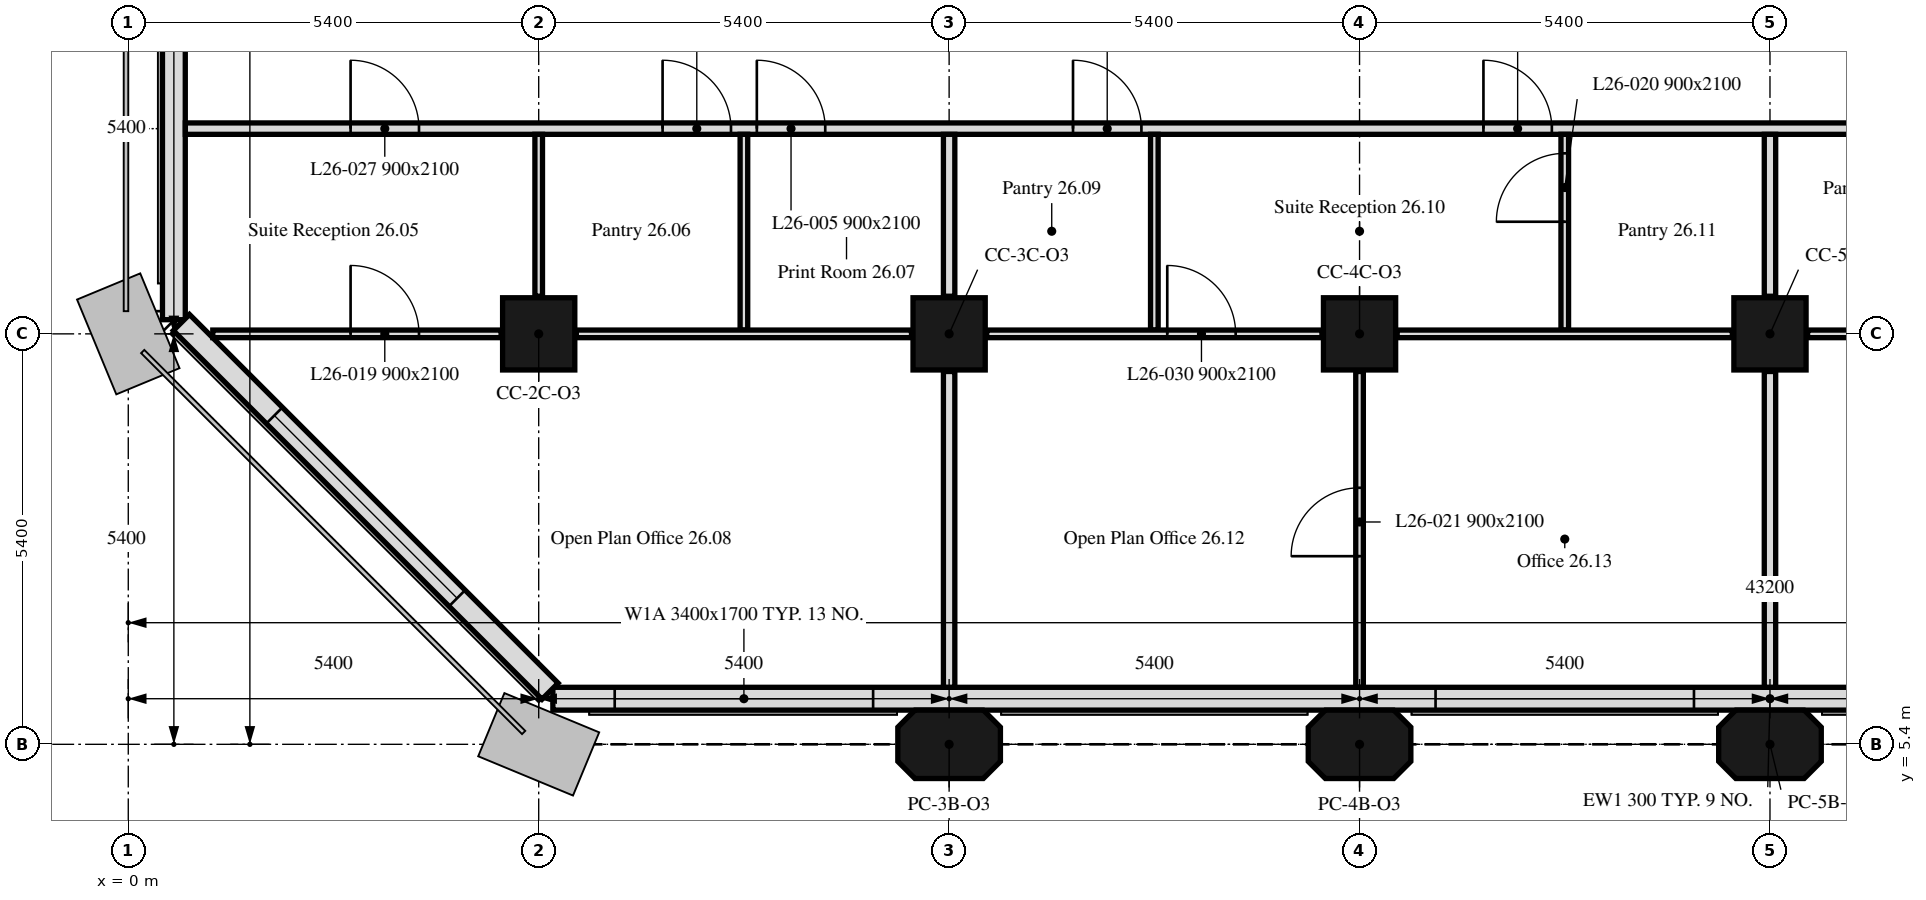
"""IFC4 building model, lengths in metres.
Left out: names, types, materials, properties, quantities, classifications, styles, units other than length and angle.
Written with IfcOpenShell. Run it as: python <this file> out.ifc"""

import sys

from ifc_helpers import new_model, si_unit, direction, frame, frame_2d, origin, origin_2d, place, context, subcontext, project, spatial, polyline, rectangle, outline, extrude, element, fill, save


model = new_model("IFC4")
c1 = context("Model", 3, precision=1e-05, world=origin(), true_north=direction((0.0, 1.0)))
c2 = subcontext(c1, "Body", "Model", "MODEL_VIEW")
j1 = project(units=[si_unit("LENGTHUNIT", "METRE"), si_unit("PLANEANGLEUNIT", "RADIAN")], contexts=[c1])
p1 = place(None, origin())
s1 = spatial("IfcSite", under=j1, at=p1, CompositionType="ELEMENT")
p2 = place(p1, origin())
s2 = spatial("IfcBuilding", under=s1, at=p2, CompositionType="ELEMENT")
p3 = place(p2, frame((0.0, 0.0, 110.6)))
s3 = spatial("IfcBuildingStorey", under=s2, at=p3, CompositionType="ELEMENT", Elevation=110.6)
for number, where, z_axis, x_axis in (
    (1, (10.8, 5.4, 0.0), (0.0, 0.0, 1.0), (1.0, 0.0, 0.0)),
    (2, (16.2, 5.4, 0.0), (0.0, 0.0, 1.0), (1.0, 0.0, 0.0)),
    (3, (21.6, 5.4, 0.0), (0.0, 0.0, 1.0), (1.0, 0.0, 0.0)),
):
    element("IfcColumn", number, at=place(p3, frame(where, z_axis=z_axis, x_axis=x_axis)), inside=s3, PredefinedType="COLUMN", context=c2, shape_type="SweptSolid", body=[
        extrude(outline(polyline([(-0.45, -0.45), (0.45, -0.45), (0.675, -0.225), (0.675, 0.225), (0.45, 0.45), (-0.45, 0.45), (-0.675, 0.225), (-0.675, -0.225), (-0.45, -0.45)])), origin(), (0.0, 0.0, 1.0), 3.5),
    ])
for number, where, z_axis, x_axis in (
    (4, (5.4, 10.8, 0.0), (0.0, 0.0, 1.0), (1.0, 0.0, 0.0)),
    (5, (10.8, 10.8, 0.0), (0.0, 0.0, 1.0), (1.0, 0.0, 0.0)),
    (6, (16.2, 10.8, 0.0), (0.0, 0.0, 1.0), (1.0, 0.0, 0.0)),
    (7, (21.6, 10.8, 0.0), (0.0, 0.0, 1.0), (1.0, 0.0, 0.0)),
):
    element("IfcColumn", number, at=place(p3, frame(where, z_axis=z_axis, x_axis=x_axis)), inside=s3, PredefinedType="COLUMN", context=c2, shape_type="SweptSolid", body=[
        extrude(rectangle(XDim=0.95, YDim=0.95, at=origin_2d()), origin(), (0.0, 0.0, 1.0), 3.5),
    ])
p4 = place(p3, frame((5.586, 6.0, 0.0), z_axis=(0.0, 0.0, 1.0), x_axis=(1.0, 0.0, 0.0)))
e8 = element("IfcWall", 8, at=p4, inside=s3, PredefinedType="SOLIDWALL", context=c2, shape_type="SweptSolid", body=[
    extrude(rectangle(XDim=32.027, YDim=0.3, at=frame_2d((16.014, 0.0))), origin(), (0.0, 0.0, 1.0), 3.5),
])
p5 = place(p4, frame((0.814, 0.0, 0.9)))
e9 = element("IfcOpeningElement", 9, at=p5, cuts=e8, PredefinedType="OPENING", context=c2, shape_type="SweptSolid", body=[
    extrude(rectangle(XDim=3.4, YDim=1.7, at=frame_2d((1.7, 0.85))), frame((0.0, 0.16, 0.0), z_axis=(0.0, -1.0, 0.0), x_axis=(1.0, 0.0, 0.0)), (0.0, 0.0, 1.0), 0.32),
])
p6 = place(p4, frame((11.614, 0.0, 0.9)))
e10 = element("IfcOpeningElement", 10, at=p6, cuts=e8, PredefinedType="OPENING", context=c2, shape_type="SweptSolid", body=[
    extrude(rectangle(XDim=3.4, YDim=1.7, at=frame_2d((1.7, 0.85))), frame((0.0, 0.16, 0.0), z_axis=(0.0, -1.0, 0.0), x_axis=(1.0, 0.0, 0.0)), (0.0, 0.0, 1.0), 0.32),
])
p7 = place(p4, frame((22.414, 0.0, 0.9)))
e11 = element("IfcOpeningElement", 11, at=p7, cuts=e8, PredefinedType="OPENING", context=c2, shape_type="SweptSolid", body=[
    extrude(rectangle(XDim=3.4, YDim=1.7, at=frame_2d((1.7, 0.85))), frame((0.0, 0.16, 0.0), z_axis=(0.0, -1.0, 0.0), x_axis=(1.0, 0.0, 0.0)), (0.0, 0.0, 1.0), 0.32),
])
p8 = place(p3, frame((0.6, 43.014, 0.0), z_axis=(0.0, 0.0, 1.0), x_axis=(0.0, -1.0, 0.0)))
e12 = element("IfcWall", 12, at=p8, inside=s3, PredefinedType="SOLIDWALL", context=c2, shape_type="SweptSolid", body=[
    extrude(rectangle(XDim=32.027, YDim=0.3, at=frame_2d((16.014, 0.0))), origin(), (0.0, 0.0, 1.0), 3.5),
])
p9 = place(p8, frame((0.814, 0.0, 0.9)))
e13 = element("IfcOpeningElement", 13, at=p9, cuts=e12, PredefinedType="OPENING", context=c2, shape_type="SweptSolid", body=[
    extrude(rectangle(XDim=3.4, YDim=1.7, at=frame_2d((1.7, 0.85))), frame((0.0, 0.16, 0.0), z_axis=(0.0, -1.0, 0.0), x_axis=(1.0, 0.0, 0.0)), (0.0, 0.0, 1.0), 0.32),
])
p10 = place(p8, frame((11.614, 0.0, 0.9)))
e14 = element("IfcOpeningElement", 14, at=p10, cuts=e12, PredefinedType="OPENING", context=c2, shape_type="SweptSolid", body=[
    extrude(rectangle(XDim=3.4, YDim=1.7, at=frame_2d((1.7, 0.85))), frame((0.0, 0.16, 0.0), z_axis=(0.0, -1.0, 0.0), x_axis=(1.0, 0.0, 0.0)), (0.0, 0.0, 1.0), 0.32),
])
p11 = place(p8, frame((22.414, 0.0, 0.9)))
e15 = element("IfcOpeningElement", 15, at=p11, cuts=e12, PredefinedType="OPENING", context=c2, shape_type="SweptSolid", body=[
    extrude(rectangle(XDim=3.4, YDim=1.7, at=frame_2d((1.7, 0.85))), frame((0.0, 0.16, 0.0), z_axis=(0.0, -1.0, 0.0), x_axis=(1.0, 0.0, 0.0)), (0.0, 0.0, 1.0), 0.32),
])
p12 = place(p3, frame((0.699, 10.949, 0.0), z_axis=(0.0, 0.0, 1.0), x_axis=(0.707106781187, -0.707106781187, 0.0)))
e16 = element("IfcWall", 16, at=p12, inside=s3, PredefinedType="SOLIDWALL", context=c2, shape_type="SweptSolid", body=[
    extrude(rectangle(XDim=6.86, YDim=0.3, at=frame_2d((3.43, 0.0))), origin(), (0.0, 0.0, 1.0), 3.5),
])
p13 = place(p12, frame((1.73, 0.0, 0.9)))
e17 = element("IfcOpeningElement", 17, at=p13, cuts=e16, PredefinedType="OPENING", context=c2, shape_type="SweptSolid", body=[
    extrude(rectangle(XDim=3.4, YDim=1.7, at=frame_2d((1.7, 0.85))), frame((0.0, 0.16, 0.0), z_axis=(0.0, -1.0, 0.0), x_axis=(1.0, 0.0, 0.0)), (0.0, 0.0, 1.0), 0.32),
])
p14 = place(p3, frame((0.751, 13.5, 0.0), z_axis=(0.0, 0.0, 1.0), x_axis=(1.0, 0.0, 0.0)))
e18 = element("IfcWall", 18, at=p14, inside=s3, PredefinedType="PARTITIONING", context=c2, shape_type="SweptSolid", body=[
    extrude(rectangle(XDim=41.698, YDim=0.15, at=frame_2d((20.849, 0.0))), origin(), (0.0, 0.0, 1.0), 3.5),
])
p15 = place(p14, frame((6.279, 0.0, 0.0)))
e19 = element("IfcOpeningElement", 19, at=p15, cuts=e18, PredefinedType="OPENING", context=c2, shape_type="SweptSolid", body=[
    extrude(rectangle(XDim=0.9, YDim=2.1, at=frame_2d((0.45, 1.05))), frame((0.0, 0.075, 0.0), z_axis=(0.0, -1.0, 0.0), x_axis=(1.0, 0.0, 0.0)), (0.0, 0.0, 1.0), 0.15),
])
p16 = place(p14, frame((7.519, 0.0, 0.0)))
e20 = element("IfcOpeningElement", 20, at=p16, cuts=e18, PredefinedType="OPENING", context=c2, shape_type="SweptSolid", body=[
    extrude(rectangle(XDim=0.9, YDim=2.1, at=frame_2d((0.45, 1.05))), frame((0.0, 0.075, 0.0), z_axis=(0.0, -1.0, 0.0), x_axis=(1.0, 0.0, 0.0)), (0.0, 0.0, 1.0), 0.15),
])
p17 = place(p14, frame((11.679, 0.0, 0.0)))
e21 = element("IfcOpeningElement", 21, at=p17, cuts=e18, PredefinedType="OPENING", context=c2, shape_type="SweptSolid", body=[
    extrude(rectangle(XDim=0.9, YDim=2.1, at=frame_2d((0.45, 1.05))), frame((0.0, 0.075, 0.0), z_axis=(0.0, -1.0, 0.0), x_axis=(1.0, 0.0, 0.0)), (0.0, 0.0, 1.0), 0.15),
])
p18 = place(p14, frame((22.479, 0.0, 0.0)))
e22 = element("IfcOpeningElement", 22, at=p18, cuts=e18, PredefinedType="OPENING", context=c2, shape_type="SweptSolid", body=[
    extrude(rectangle(XDim=0.9, YDim=2.1, at=frame_2d((0.45, 1.05))), frame((0.0, 0.075, 0.0), z_axis=(0.0, -1.0, 0.0), x_axis=(1.0, 0.0, 0.0)), (0.0, 0.0, 1.0), 0.15),
])
p19 = place(p14, frame((23.719, 0.0, 0.0)))
e23 = element("IfcOpeningElement", 23, at=p19, cuts=e18, PredefinedType="OPENING", context=c2, shape_type="SweptSolid", body=[
    extrude(rectangle(XDim=0.9, YDim=2.1, at=frame_2d((0.45, 1.05))), frame((0.0, 0.075, 0.0), z_axis=(0.0, -1.0, 0.0), x_axis=(1.0, 0.0, 0.0)), (0.0, 0.0, 1.0), 0.15),
])
p20 = place(p14, frame((2.174, 0.0, 0.0)))
e24 = element("IfcOpeningElement", 24, at=p20, cuts=e18, PredefinedType="OPENING", context=c2, shape_type="SweptSolid", body=[
    extrude(rectangle(XDim=0.9, YDim=2.1, at=frame_2d((0.45, 1.05))), frame((0.0, 0.075, 0.0), z_axis=(0.0, -1.0, 0.0), x_axis=(1.0, 0.0, 0.0)), (0.0, 0.0, 1.0), 0.15),
])
p21 = place(p14, frame((17.079, 0.0, 0.0)))
e25 = element("IfcOpeningElement", 25, at=p21, cuts=e18, PredefinedType="OPENING", context=c2, shape_type="SweptSolid", body=[
    extrude(rectangle(XDim=0.9, YDim=2.1, at=frame_2d((0.45, 1.05))), frame((0.0, 0.075, 0.0), z_axis=(0.0, -1.0, 0.0), x_axis=(1.0, 0.0, 0.0)), (0.0, 0.0, 1.0), 0.15),
])
p22 = place(p14, frame((34.519, 0.0, 0.0)))
e26 = element("IfcOpeningElement", 26, at=p22, cuts=e18, PredefinedType="OPENING", context=c2, shape_type="SweptSolid", body=[
    extrude(rectangle(XDim=0.9, YDim=2.1, at=frame_2d((0.45, 1.05))), frame((0.0, 0.075, 0.0), z_axis=(0.0, -1.0, 0.0), x_axis=(1.0, 0.0, 0.0)), (0.0, 0.0, 1.0), 0.15),
])
p23 = place(p3, frame((1.112, 10.8, 0.0), z_axis=(0.0, 0.0, 1.0), x_axis=(1.0, 0.0, 0.0)))
e27 = element("IfcWall", 27, at=p23, inside=s3, PredefinedType="PARTITIONING", context=c2, shape_type="SweptSolid", body=[
    extrude(rectangle(XDim=3.793, YDim=0.1, at=frame_2d((1.896, 0.0))), origin(), (0.0, 0.0, 1.0), 3.5),
])
p24 = place(p23, frame((1.813, 0.0, 0.0)))
e28 = element("IfcOpeningElement", 28, at=p24, cuts=e27, PredefinedType="OPENING", context=c2, shape_type="SweptSolid", body=[
    extrude(rectangle(XDim=0.9, YDim=2.1, at=frame_2d((0.45, 1.05))), frame((0.0, 0.05, 0.0), z_axis=(0.0, -1.0, 0.0), x_axis=(1.0, 0.0, 0.0)), (0.0, 0.0, 1.0), 0.1),
])
p25 = place(p3, frame((5.4, 11.295, 0.0), z_axis=(0.0, 0.0, 1.0), x_axis=(0.0, 1.0, 0.0)))
e29 = element("IfcWall", 29, at=p25, inside=s3, PredefinedType="PARTITIONING", context=c2, shape_type="SweptSolid", body=[
    extrude(rectangle(XDim=2.13, YDim=0.1, at=frame_2d((1.065, 0.0))), origin(), (0.0, 0.0, 1.0), 3.5),
])
p26 = place(p3, frame((8.1, 10.85, 0.0), z_axis=(0.0, 0.0, 1.0), x_axis=(0.0, 1.0, 0.0)))
e30 = element("IfcWall", 30, at=p26, inside=s3, PredefinedType="PARTITIONING", context=c2, shape_type="SweptSolid", body=[
    extrude(rectangle(XDim=2.575, YDim=0.1, at=frame_2d((1.288, 0.0))), origin(), (0.0, 0.0, 1.0), 3.5),
])
p27 = place(p3, frame((5.895, 10.8, 0.0), z_axis=(0.0, 0.0, 1.0), x_axis=(1.0, 0.0, 0.0)))
e31 = element("IfcWall", 31, at=p27, inside=s3, PredefinedType="PARTITIONING", context=c2, shape_type="SweptSolid", body=[
    extrude(rectangle(XDim=4.41, YDim=0.1, at=frame_2d((2.205, 0.0))), origin(), (0.0, 0.0, 1.0), 3.5),
])
p28 = place(p3, frame((10.8, 11.295, 0.0), z_axis=(0.0, 0.0, 1.0), x_axis=(0.0, 1.0, 0.0)))
e32 = element("IfcWall", 32, at=p28, inside=s3, PredefinedType="PARTITIONING", context=c2, shape_type="SweptSolid", body=[
    extrude(rectangle(XDim=2.13, YDim=0.15, at=frame_2d((1.065, 0.0))), origin(), (0.0, 0.0, 1.0), 3.5),
])
p29 = place(p3, frame((10.8, 6.151, 0.0), z_axis=(0.0, 0.0, 1.0), x_axis=(0.0, 1.0, 0.0)))
e33 = element("IfcWall", 33, at=p29, inside=s3, PredefinedType="PARTITIONING", context=c2, shape_type="SweptSolid", body=[
    extrude(rectangle(XDim=4.154, YDim=0.15, at=frame_2d((2.077, 0.0))), origin(), (0.0, 0.0, 1.0), 3.5),
])
p30 = place(p3, frame((13.5, 10.85, 0.0), z_axis=(0.0, 0.0, 1.0), x_axis=(0.0, 1.0, 0.0)))
e34 = element("IfcWall", 34, at=p30, inside=s3, PredefinedType="PARTITIONING", context=c2, shape_type="SweptSolid", body=[
    extrude(rectangle(XDim=2.575, YDim=0.1, at=frame_2d((1.288, 0.0))), origin(), (0.0, 0.0, 1.0), 3.5),
])
p31 = place(p3, frame((11.295, 10.8, 0.0), z_axis=(0.0, 0.0, 1.0), x_axis=(1.0, 0.0, 0.0)))
e35 = element("IfcWall", 35, at=p31, inside=s3, PredefinedType="PARTITIONING", context=c2, shape_type="SweptSolid", body=[
    extrude(rectangle(XDim=4.41, YDim=0.1, at=frame_2d((2.205, 0.0))), origin(), (0.0, 0.0, 1.0), 3.5),
])
p32 = place(p31, frame((2.375, 0.0, 0.0)))
e36 = element("IfcOpeningElement", 36, at=p32, cuts=e35, PredefinedType="OPENING", context=c2, shape_type="SweptSolid", body=[
    extrude(rectangle(XDim=0.9, YDim=2.1, at=frame_2d((0.45, 1.05))), frame((0.0, 0.05, 0.0), z_axis=(0.0, -1.0, 0.0), x_axis=(1.0, 0.0, 0.0)), (0.0, 0.0, 1.0), 0.1),
])
p33 = place(p3, frame((18.9, 10.85, 0.0), z_axis=(0.0, 0.0, 1.0), x_axis=(0.0, 1.0, 0.0)))
e37 = element("IfcWall", 37, at=p33, inside=s3, PredefinedType="PARTITIONING", context=c2, shape_type="SweptSolid", body=[
    extrude(rectangle(XDim=2.575, YDim=0.1, at=frame_2d((1.288, 0.0))), origin(), (0.0, 0.0, 1.0), 3.5),
])
p34 = place(p33, frame((1.425, 0.0, 0.0)))
e38 = element("IfcOpeningElement", 38, at=p34, cuts=e37, PredefinedType="OPENING", context=c2, shape_type="SweptSolid", body=[
    extrude(rectangle(XDim=0.9, YDim=2.1, at=frame_2d((0.45, 1.05))), frame((0.0, 0.05, 0.0), z_axis=(0.0, -1.0, 0.0), x_axis=(1.0, 0.0, 0.0)), (0.0, 0.0, 1.0), 0.1),
])
p35 = place(p3, frame((16.695, 10.8, 0.0), z_axis=(0.0, 0.0, 1.0), x_axis=(1.0, 0.0, 0.0)))
e39 = element("IfcWall", 39, at=p35, inside=s3, PredefinedType="PARTITIONING", context=c2, shape_type="SweptSolid", body=[
    extrude(rectangle(XDim=4.41, YDim=0.1, at=frame_2d((2.205, 0.0))), origin(), (0.0, 0.0, 1.0), 3.5),
])
p36 = place(p3, frame((21.6, 11.295, 0.0), z_axis=(0.0, 0.0, 1.0), x_axis=(0.0, 1.0, 0.0)))
e40 = element("IfcWall", 40, at=p36, inside=s3, PredefinedType="PARTITIONING", context=c2, shape_type="SweptSolid", body=[
    extrude(rectangle(XDim=2.13, YDim=0.15, at=frame_2d((1.065, 0.0))), origin(), (0.0, 0.0, 1.0), 3.5),
])
p37 = place(p3, frame((16.2, 6.151, 0.0), z_axis=(0.0, 0.0, 1.0), x_axis=(0.0, 1.0, 0.0)))
e41 = element("IfcWall", 41, at=p37, inside=s3, PredefinedType="PARTITIONING", context=c2, shape_type="SweptSolid", body=[
    extrude(rectangle(XDim=4.154, YDim=0.1, at=frame_2d((2.077, 0.0))), origin(), (0.0, 0.0, 1.0), 3.5),
])
p38 = place(p37, frame((1.724, 0.0, 0.0)))
e42 = element("IfcOpeningElement", 42, at=p38, cuts=e41, PredefinedType="OPENING", context=c2, shape_type="SweptSolid", body=[
    extrude(rectangle(XDim=0.9, YDim=2.1, at=frame_2d((0.45, 1.05))), frame((0.0, 0.05, 0.0), z_axis=(0.0, -1.0, 0.0), x_axis=(1.0, 0.0, 0.0)), (0.0, 0.0, 1.0), 0.1),
])
p39 = place(p3, frame((21.6, 6.151, 0.0), z_axis=(0.0, 0.0, 1.0), x_axis=(0.0, 1.0, 0.0)))
e43 = element("IfcWall", 43, at=p39, inside=s3, PredefinedType="PARTITIONING", context=c2, shape_type="SweptSolid", body=[
    extrude(rectangle(XDim=4.154, YDim=0.15, at=frame_2d((2.077, 0.0))), origin(), (0.0, 0.0, 1.0), 3.5),
])
p40 = place(p3, frame((22.095, 10.8, 0.0), z_axis=(0.0, 0.0, 1.0), x_axis=(1.0, 0.0, 0.0)))
e44 = element("IfcWall", 44, at=p40, inside=s3, PredefinedType="PARTITIONING", context=c2, shape_type="SweptSolid", body=[
    extrude(rectangle(XDim=4.41, YDim=0.1, at=frame_2d((2.205, 0.0))), origin(), (0.0, 0.0, 1.0), 3.5),
])
p41 = place(p5, origin())
e45 = element("IfcWindow", 45, at=p41, inside=s3, PartitioningType="SINGLE_PANEL", PredefinedType="WINDOW", context=c2, shape_type="SweptSolid", body=[
    extrude(rectangle(XDim=3.4, YDim=1.7, at=frame_2d((1.7, 0.85))), frame((0.0, 0.03, 0.0), z_axis=(0.0, -1.0, 0.0), x_axis=(1.0, 0.0, 0.0)), (0.0, 0.0, 1.0), 0.06),
])
fill(e9, e45)
p42 = place(p6, origin())
e46 = element("IfcWindow", 46, at=p42, inside=s3, PartitioningType="SINGLE_PANEL", PredefinedType="WINDOW", context=c2, shape_type="SweptSolid", body=[
    extrude(rectangle(XDim=3.4, YDim=1.7, at=frame_2d((1.7, 0.85))), frame((0.0, 0.03, 0.0), z_axis=(0.0, -1.0, 0.0), x_axis=(1.0, 0.0, 0.0)), (0.0, 0.0, 1.0), 0.06),
])
fill(e10, e46)
p43 = place(p13, origin())
e47 = element("IfcWindow", 47, at=p43, inside=s3, PartitioningType="SINGLE_PANEL", PredefinedType="WINDOW", context=c2, shape_type="SweptSolid", body=[
    extrude(rectangle(XDim=3.4, YDim=1.7, at=frame_2d((1.7, 0.85))), frame((0.0, 0.03, 0.0), z_axis=(0.0, -1.0, 0.0), x_axis=(1.0, 0.0, 0.0)), (0.0, 0.0, 1.0), 0.06),
])
fill(e17, e47)
p44 = place(p15, origin())
e48 = element("IfcDoor", 48, at=p44, inside=s3, OperationType="SINGLE_SWING_RIGHT", PredefinedType="DOOR", context=c2, shape_type="SweptSolid", body=[
    extrude(rectangle(XDim=0.9, YDim=2.1, at=frame_2d((0.45, 1.05))), frame((0.0, 0.025, 0.0), z_axis=(0.0, -1.0, 0.0), x_axis=(1.0, 0.0, 0.0)), (0.0, 0.0, 1.0), 0.05),
])
fill(e19, e48)
p45 = place(p16, origin())
e49 = element("IfcDoor", 49, at=p45, inside=s3, OperationType="SINGLE_SWING_RIGHT", PredefinedType="DOOR", context=c2, shape_type="SweptSolid", body=[
    extrude(rectangle(XDim=0.9, YDim=2.1, at=frame_2d((0.45, 1.05))), frame((0.0, 0.025, 0.0), z_axis=(0.0, -1.0, 0.0), x_axis=(1.0, 0.0, 0.0)), (0.0, 0.0, 1.0), 0.05),
])
fill(e20, e49)
p46 = place(p17, origin())
e50 = element("IfcDoor", 50, at=p46, inside=s3, OperationType="SINGLE_SWING_RIGHT", PredefinedType="DOOR", context=c2, shape_type="SweptSolid", body=[
    extrude(rectangle(XDim=0.9, YDim=2.1, at=frame_2d((0.45, 1.05))), frame((0.0, 0.025, 0.0), z_axis=(0.0, -1.0, 0.0), x_axis=(1.0, 0.0, 0.0)), (0.0, 0.0, 1.0), 0.05),
])
fill(e21, e50)
p47 = place(p24, origin())
e51 = element("IfcDoor", 51, at=p47, inside=s3, OperationType="SINGLE_SWING_RIGHT", PredefinedType="DOOR", context=c2, shape_type="SweptSolid", body=[
    extrude(rectangle(XDim=0.9, YDim=2.1, at=frame_2d((0.45, 1.05))), frame((0.0, 0.025, 0.0), z_axis=(0.0, -1.0, 0.0), x_axis=(1.0, 0.0, 0.0)), (0.0, 0.0, 1.0), 0.05),
])
fill(e28, e51)
p48 = place(p34, origin())
e52 = element("IfcDoor", 52, at=p48, inside=s3, OperationType="SINGLE_SWING_RIGHT", PredefinedType="DOOR", context=c2, shape_type="SweptSolid", body=[
    extrude(rectangle(XDim=0.9, YDim=2.1, at=frame_2d((0.45, 1.05))), frame((0.0, 0.025, 0.0), z_axis=(0.0, -1.0, 0.0), x_axis=(1.0, 0.0, 0.0)), (0.0, 0.0, 1.0), 0.05),
])
fill(e38, e52)
p49 = place(p38, origin())
e53 = element("IfcDoor", 53, at=p49, inside=s3, OperationType="SINGLE_SWING_RIGHT", PredefinedType="DOOR", context=c2, shape_type="SweptSolid", body=[
    extrude(rectangle(XDim=0.9, YDim=2.1, at=frame_2d((0.45, 1.05))), frame((0.0, 0.025, 0.0), z_axis=(0.0, -1.0, 0.0), x_axis=(1.0, 0.0, 0.0)), (0.0, 0.0, 1.0), 0.05),
])
fill(e42, e53)
p50 = place(p20, origin())
e54 = element("IfcDoor", 54, at=p50, inside=s3, OperationType="SINGLE_SWING_RIGHT", PredefinedType="DOOR", context=c2, shape_type="SweptSolid", body=[
    extrude(rectangle(XDim=0.9, YDim=2.1, at=frame_2d((0.45, 1.05))), frame((0.0, 0.025, 0.0), z_axis=(0.0, -1.0, 0.0), x_axis=(1.0, 0.0, 0.0)), (0.0, 0.0, 1.0), 0.05),
])
fill(e24, e54)
p51 = place(p32, origin())
e55 = element("IfcDoor", 55, at=p51, inside=s3, OperationType="SINGLE_SWING_LEFT", PredefinedType="DOOR", context=c2, shape_type="SweptSolid", body=[
    extrude(rectangle(XDim=0.9, YDim=2.1, at=frame_2d((0.45, 1.05))), frame((0.0, 0.025, 0.0), z_axis=(0.0, -1.0, 0.0), x_axis=(1.0, 0.0, 0.0)), (0.0, 0.0, 1.0), 0.05),
])
fill(e36, e55)
p52 = place(p21, origin())
e56 = element("IfcDoor", 56, at=p52, inside=s3, OperationType="SINGLE_SWING_RIGHT", PredefinedType="DOOR", context=c2, shape_type="SweptSolid", body=[
    extrude(rectangle(XDim=0.9, YDim=2.1, at=frame_2d((0.45, 1.05))), frame((0.0, 0.025, 0.0), z_axis=(0.0, -1.0, 0.0), x_axis=(1.0, 0.0, 0.0)), (0.0, 0.0, 1.0), 0.05),
])
fill(e25, e56)
save(model, sys.argv[1])
